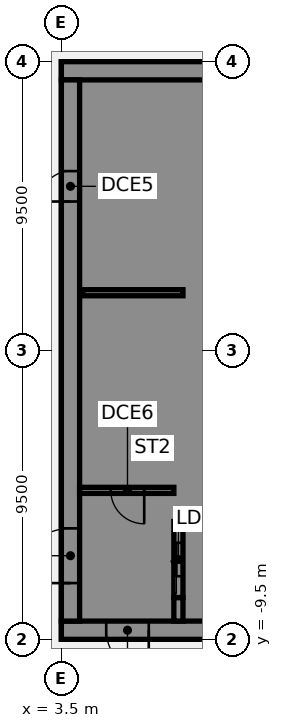
"""IFC4 building model, lengths in metres.
Left out: names, types, materials, properties, quantities, classifications, styles, units other than length and angle.
Written with IfcOpenShell. Run it as: python <this file> out.ifc"""

import sys

from ifc_helpers import new_model, si_unit, direction, frame, frame_2d, origin, place, context, subcontext, project, spatial, polyline, rectangle, outline, extrude, element, fill, save


model = new_model("IFC4")
c1 = context("Model", 3, precision=1e-05, world=origin(), true_north=direction((0.0, 1.0)))
c2 = subcontext(c1, "Body", "Model", "MODEL_VIEW")
j1 = project(units=[si_unit("LENGTHUNIT", "METRE"), si_unit("PLANEANGLEUNIT", "RADIAN")], contexts=[c1])
p1 = place(None, origin())
s1 = spatial("IfcSite", under=j1, at=p1, CompositionType="ELEMENT")
p2 = place(p1, origin())
s2 = spatial("IfcBuilding", under=s1, at=p2, CompositionType="ELEMENT")
p3 = place(p2, frame((0.0, 0.0, 106.0)))
s3 = spatial("IfcBuildingStorey", under=s2, at=p3, CompositionType="ELEMENT", Elevation=106.0)
p4 = place(p3, frame((16.5, -9.2, 0.0), z_axis=(0.0, 0.0, 1.0), x_axis=(-1.0, 0.0, 0.0)))
e1 = element("IfcWall", 1, at=p4, inside=s3, PredefinedType="SHEAR", context=c2, shape_type="SweptSolid", body=[
    extrude(rectangle(XDim=13.0, YDim=0.6, at=frame_2d((6.5, 0.0))), origin(), (0.0, 0.0, 1.0), 3.61),
])
p5 = place(p4, frame((4.15, 0.0, 0.0)))
e2 = element("IfcOpeningElement", 2, at=p5, cuts=e1, PredefinedType="OPENING", context=c2, shape_type="SweptSolid", body=[
    extrude(rectangle(XDim=1.4, YDim=2.1, at=frame_2d((0.7, 1.05))), frame((0.0, 0.31, 0.0), z_axis=(0.0, -1.0, 0.0), x_axis=(1.0, 0.0, 0.0)), (0.0, 0.0, 1.0), 0.62),
])
p6 = place(p4, frame((10.125, 0.0, 0.0)))
e3 = element("IfcOpeningElement", 3, at=p6, cuts=e1, PredefinedType="OPENING", context=c2, shape_type="SweptSolid", body=[
    extrude(rectangle(XDim=1.4, YDim=2.1, at=frame_2d((0.7, 1.05))), frame((0.0, 0.31, 0.0), z_axis=(0.0, -1.0, 0.0), x_axis=(1.0, 0.0, 0.0)), (0.0, 0.0, 1.0), 0.62),
])
p7 = place(p3, frame((16.5, 9.2, 0.0), z_axis=(0.0, 0.0, 1.0), x_axis=(-1.0, 0.0, 0.0)))
e4 = element("IfcWall", 4, at=p7, inside=s3, PredefinedType="SHEAR", context=c2, shape_type="SweptSolid", body=[
    extrude(rectangle(XDim=13.0, YDim=0.6, at=frame_2d((6.5, 0.0))), origin(), (0.0, 0.0, 1.0), 3.61),
])
p8 = place(p3, origin())
e5 = element("IfcWall", 5, at=p8, inside=s3, PredefinedType="SHEAR", context=c2, shape_type="SweptSolid", body=[
    extrude(outline(polyline([(9.8, -5.375), (7.5, -5.375), (7.5, -2.875), (9.8, -2.875), (9.8, -2.625), (7.5, -2.625), (7.5, -0.125), (9.8, -0.125), (9.8, 0.125), (7.5, 0.125), (7.5, 2.625), (9.8, 2.625), (9.8, 2.875), (7.5, 2.875), (7.5, 5.375), (9.8, 5.375), (9.8, 5.625), (7.5, 5.625), (7.5, 8.125), (9.8, 8.125), (9.8, 8.9), (7.5, 8.9), (7.2, 8.9), (7.2, -5.625), (7.5, -5.625), (9.8, -5.625), (9.8, -5.375)])), origin(), (0.0, 0.0, 1.0), 3.61),
])
p9 = place(p3, origin())
e6 = element("IfcWall", 6, at=p9, inside=s3, PredefinedType="SHEAR", context=c2, shape_type="SweptSolid", body=[
    extrude(outline(polyline([(7.5, -8.125), (7.5, -8.9), (9.8, -8.9), (9.8, -8.125), (9.8, -5.625), (9.55, -5.625), (9.55, -8.125), (7.5, -8.125)])), origin(), (0.0, 0.0, 1.0), 3.61),
])
p10 = place(p3, frame((7.35, -8.9, 0.0), z_axis=(0.0, 0.0, 1.0), x_axis=(0.0, 1.0, 0.0)))
e7 = element("IfcWall", 7, at=p10, inside=s3, PredefinedType="SHEAR", context=c2, shape_type="SweptSolid", body=[
    extrude(rectangle(XDim=0.775, YDim=0.3, at=frame_2d((0.387, 0.0))), origin(), (0.0, 0.0, 1.0), 3.61),
])
p11 = place(p3, frame((7.5, 1.9, 0.0), z_axis=(0.0, 0.0, 1.0), x_axis=(-1.0, 0.0, 0.0)))
e8 = element("IfcWall", 8, at=p11, inside=s3, PredefinedType="SHEAR", context=c2, shape_type="SweptSolid", body=[
    extrude(rectangle(XDim=3.3, YDim=0.2, at=frame_2d((1.65, 0.0))), origin(), (0.0, 0.0, 1.0), 3.61),
])
p12 = place(p3, frame((7.35, -8.125, 0.0), z_axis=(0.0, 0.0, 1.0), x_axis=(0.0, 1.0, 0.0)))
e9 = element("IfcWall", 9, at=p12, inside=s3, PredefinedType="SHEAR", context=c2, shape_type="SweptSolid", body=[
    extrude(rectangle(XDim=2.5, YDim=0.3, at=frame_2d((1.25, 0.0))), origin(), (0.0, 0.0, 1.0), 3.61),
])
p13 = place(p12, frame((0.7, 0.0, 0.0)))
e10 = element("IfcOpeningElement", 10, at=p13, cuts=e9, PredefinedType="OPENING", context=c2, shape_type="SweptSolid", body=[
    extrude(rectangle(XDim=1.1, YDim=2.1, at=frame_2d((0.55, 1.05))), frame((0.0, 0.16, 0.0), z_axis=(0.0, -1.0, 0.0), x_axis=(1.0, 0.0, 0.0)), (0.0, 0.0, 1.0), 0.32),
])
p14 = place(p3, frame((3.8, -8.9, 0.0), z_axis=(0.0, 0.0, 1.0), x_axis=(0.0, 1.0, 0.0)))
e11 = element("IfcWall", 11, at=p14, inside=s3, PredefinedType="SHEAR", context=c2, shape_type="SweptSolid", body=[
    extrude(rectangle(XDim=17.8, YDim=0.6, at=frame_2d((8.9, 0.0))), origin(), (0.0, 0.0, 1.0), 3.61),
])
p15 = place(p14, frame((1.25, 0.0, 0.0)))
e12 = element("IfcOpeningElement", 12, at=p15, cuts=e11, PredefinedType="OPENING", context=c2, shape_type="SweptSolid", body=[
    extrude(rectangle(XDim=1.8, YDim=2.1, at=frame_2d((0.9, 1.05))), frame((0.0, 0.31, 0.0), z_axis=(0.0, -1.0, 0.0), x_axis=(1.0, 0.0, 0.0)), (0.0, 0.0, 1.0), 0.62),
])
p16 = place(p14, frame((13.8, 0.0, 0.0)))
e13 = element("IfcOpeningElement", 13, at=p16, cuts=e11, PredefinedType="OPENING", context=c2, shape_type="SweptSolid", body=[
    extrude(rectangle(XDim=1.0, YDim=2.1, at=frame_2d((0.5, 1.05))), frame((0.0, 0.31, 0.0), z_axis=(0.0, -1.0, 0.0), x_axis=(1.0, 0.0, 0.0)), (0.0, 0.0, 1.0), 0.62),
])
p17 = place(p3, frame((7.2, -4.6, 0.0), z_axis=(0.0, 0.0, 1.0), x_axis=(-1.0, 0.0, 0.0)))
e14 = element("IfcWall", 14, at=p17, inside=s3, PredefinedType="SHEAR", context=c2, shape_type="SweptSolid", body=[
    extrude(rectangle(XDim=3.1, YDim=0.2, at=frame_2d((1.55, 0.0))), origin(), (0.0, 0.0, 1.0), 3.61),
])
p18 = place(p17, frame((0.975, 0.0, 0.0)))
e15 = element("IfcOpeningElement", 15, at=p18, cuts=e14, PredefinedType="OPENING", context=c2, shape_type="SweptSolid", body=[
    extrude(rectangle(XDim=1.1, YDim=2.1, at=frame_2d((0.55, 1.05))), frame((0.0, 0.11, 0.0), z_axis=(0.0, -1.0, 0.0), x_axis=(1.0, 0.0, 0.0)), (0.0, 0.0, 1.0), 0.22),
])
p19 = place(p6, origin())
e16 = element("IfcDoor", 16, at=p19, inside=s3, OperationType="SINGLE_SWING_LEFT", PredefinedType="DOOR", context=c2, shape_type="SweptSolid", body=[
    extrude(rectangle(XDim=1.4, YDim=2.1, at=frame_2d((0.7, 1.05))), frame((0.0, 0.025, 0.0), z_axis=(0.0, -1.0, 0.0), x_axis=(1.0, 0.0, 0.0)), (0.0, 0.0, 1.0), 0.05),
])
fill(e3, e16)
p20 = place(p15, origin())
e17 = element("IfcDoor", 17, at=p20, inside=s3, OperationType="SINGLE_SWING_LEFT", PredefinedType="DOOR", context=c2, shape_type="SweptSolid", body=[
    extrude(rectangle(XDim=1.8, YDim=2.1, at=frame_2d((0.9, 1.05))), frame((0.0, 0.025, 0.0), z_axis=(0.0, -1.0, 0.0), x_axis=(1.0, 0.0, 0.0)), (0.0, 0.0, 1.0), 0.05),
])
fill(e12, e17)
p21 = place(p16, origin())
e18 = element("IfcDoor", 18, at=p21, inside=s3, OperationType="SINGLE_SWING_LEFT", PredefinedType="DOOR", context=c2, shape_type="SweptSolid", body=[
    extrude(rectangle(XDim=1.0, YDim=2.1, at=frame_2d((0.5, 1.05))), frame((0.0, 0.025, 0.0), z_axis=(0.0, -1.0, 0.0), x_axis=(1.0, 0.0, 0.0)), (0.0, 0.0, 1.0), 0.05),
])
fill(e13, e18)
p22 = place(p18, origin())
e19 = element("IfcDoor", 19, at=p22, inside=s3, OperationType="SINGLE_SWING_LEFT", PredefinedType="DOOR", context=c2, shape_type="SweptSolid", body=[
    extrude(rectangle(XDim=1.1, YDim=2.1, at=frame_2d((0.55, 1.05))), frame((0.0, 0.025, 0.0), z_axis=(0.0, -1.0, 0.0), x_axis=(1.0, 0.0, 0.0)), (0.0, 0.0, 1.0), 0.05),
])
fill(e15, e19)
p23 = place(p13, origin())
e20 = element("IfcDoor", 20, at=p23, inside=s3, OperationType="SLIDING_TO_LEFT", PredefinedType="DOOR", context=c2, shape_type="SweptSolid", body=[
    extrude(rectangle(XDim=1.1, YDim=2.1, at=frame_2d((0.55, 1.05))), frame((0.0, 0.025, 0.0), z_axis=(0.0, -1.0, 0.0), x_axis=(1.0, 0.0, 0.0)), (0.0, 0.0, 1.0), 0.05),
])
fill(e10, e20)
save(model, sys.argv[1])
